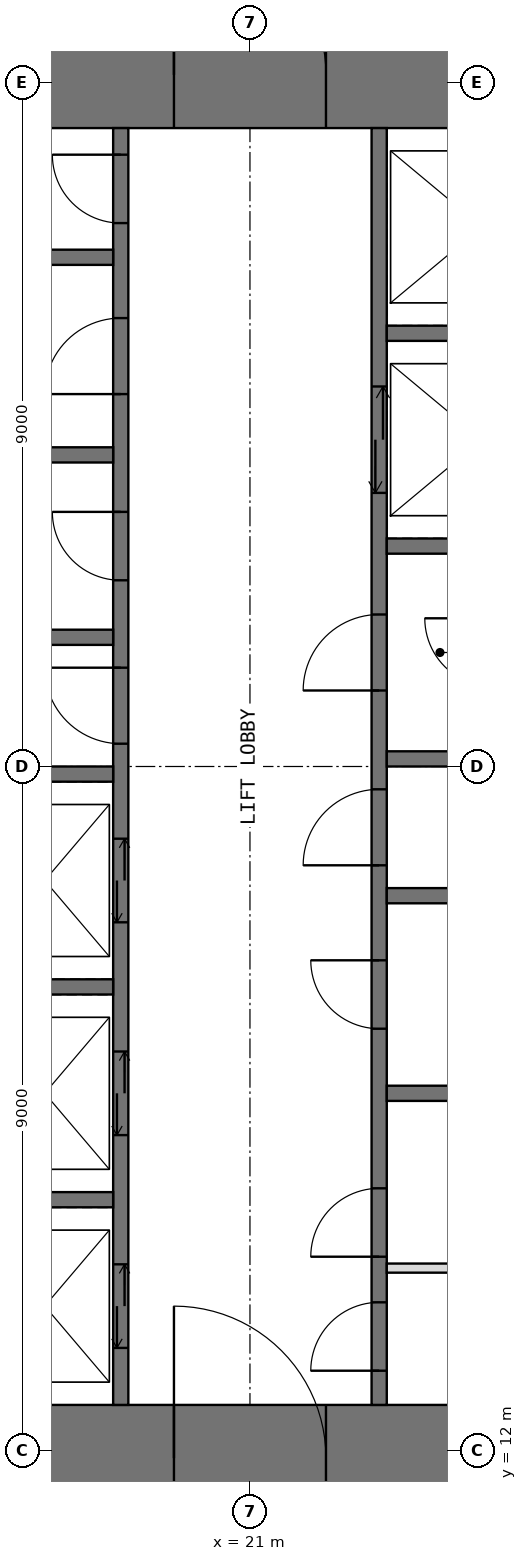
"""IFC4 building model, lengths in metres.
Left out: names, types, materials, properties, quantities, classifications, styles, units other than length and angle.
Written with IfcOpenShell. Run it as: python <this file> out.ifc"""

import sys

from ifc_helpers import new_model, si_unit, direction, frame, frame_2d, origin, place, context, subcontext, project, spatial, rectangle, extrude, element, fill, save


model = new_model("IFC4")
c1 = context("Model", 3, precision=1e-05, world=origin(), true_north=direction((0.0, 1.0)))
c2 = subcontext(c1, "Body", "Model", "MODEL_VIEW")
j1 = project(units=[si_unit("LENGTHUNIT", "METRE"), si_unit("PLANEANGLEUNIT", "RADIAN")], contexts=[c1])
p1 = place(None, origin())
s1 = spatial("IfcSite", under=j1, at=p1, CompositionType="ELEMENT")
p2 = place(p1, origin())
s2 = spatial("IfcBuilding", under=s1, at=p2, CompositionType="ELEMENT")
p3 = place(p2, frame((0.0, 0.0, 165.5)))
s3 = spatial("IfcBuildingStorey", under=s2, at=p3, CompositionType="ELEMENT", Elevation=165.5)
p4 = place(p3, frame((11.2, 11.9, -0.05), z_axis=(0.0, 0.0, 1.0), x_axis=(1.0, 0.0, 0.0)))
e1 = element("IfcWall", 1, at=p4, inside=s3, PredefinedType="SHEAR", context=c2, shape_type="SweptSolid", body=[
    extrude(rectangle(XDim=19.6, YDim=1.4, at=frame_2d((9.8, 0.0))), origin(), (0.0, 0.0, 1.0), 5.0),
])
p5 = place(p4, frame((8.8, 0.0, 0.05)))
e2 = element("IfcOpeningElement", 2, at=p5, cuts=e1, PredefinedType="OPENING", context=c2, shape_type="SweptSolid", body=[
    extrude(rectangle(XDim=2.0, YDim=2.2, at=frame_2d((1.0, 1.1))), frame((0.0, 0.71, 0.0), z_axis=(0.0, -1.0, 0.0), x_axis=(1.0, 0.0, 0.0)), (0.0, 0.0, 1.0), 1.42),
])
p6 = place(p3, frame((11.2, 30.1, -0.05), z_axis=(0.0, 0.0, 1.0), x_axis=(1.0, 0.0, 0.0)))
e3 = element("IfcWall", 3, at=p6, inside=s3, PredefinedType="SHEAR", context=c2, shape_type="SweptSolid", body=[
    extrude(rectangle(XDim=19.6, YDim=1.4, at=frame_2d((9.8, 0.0))), origin(), (0.0, 0.0, 1.0), 5.0),
])
p7 = place(p6, frame((8.8, 0.0, 0.05)))
e4 = element("IfcOpeningElement", 4, at=p7, cuts=e3, PredefinedType="OPENING", context=c2, shape_type="SweptSolid", body=[
    extrude(rectangle(XDim=2.0, YDim=2.2, at=frame_2d((1.0, 1.1))), frame((0.0, 0.71, 0.0), z_axis=(0.0, -1.0, 0.0), x_axis=(1.0, 0.0, 0.0)), (0.0, 0.0, 1.0), 1.42),
])
p8 = place(p3, frame((19.3, 12.6, -0.05), z_axis=(0.0, 0.0, 1.0), x_axis=(0.0, 1.0, 0.0)))
e5 = element("IfcWall", 5, at=p8, inside=s3, PredefinedType="SHEAR", context=c2, shape_type="SweptSolid", body=[
    extrude(rectangle(XDim=16.8, YDim=0.2, at=frame_2d((8.4, 0.0))), origin(), (0.0, 0.0, 1.0), 5.0),
])
p9 = place(p8, frame((8.7, 0.0, 0.05)))
e6 = element("IfcOpeningElement", 6, at=p9, cuts=e5, PredefinedType="OPENING", context=c2, shape_type="SweptSolid", body=[
    extrude(rectangle(XDim=1.0, YDim=2.2, at=frame_2d((0.5, 1.1))), frame((0.0, 0.11, 0.0), z_axis=(0.0, -1.0, 0.0), x_axis=(1.0, 0.0, 0.0)), (0.0, 0.0, 1.0), 0.22),
])
p10 = place(p8, frame((10.85, 0.0, 0.05)))
e7 = element("IfcOpeningElement", 7, at=p10, cuts=e5, PredefinedType="OPENING", context=c2, shape_type="SweptSolid", body=[
    extrude(rectangle(XDim=0.9, YDim=2.2, at=frame_2d((0.45, 1.1))), frame((0.0, 0.11, 0.0), z_axis=(0.0, -1.0, 0.0), x_axis=(1.0, 0.0, 0.0)), (0.0, 0.0, 1.0), 0.22),
])
p11 = place(p8, frame((13.3, 0.0, 0.05)))
e8 = element("IfcOpeningElement", 8, at=p11, cuts=e5, PredefinedType="OPENING", context=c2, shape_type="SweptSolid", body=[
    extrude(rectangle(XDim=1.0, YDim=2.2, at=frame_2d((0.5, 1.1))), frame((0.0, 0.11, 0.0), z_axis=(0.0, -1.0, 0.0), x_axis=(1.0, 0.0, 0.0)), (0.0, 0.0, 1.0), 0.22),
])
p12 = place(p8, frame((15.55, 0.0, 0.05)))
e9 = element("IfcOpeningElement", 9, at=p12, cuts=e5, PredefinedType="OPENING", context=c2, shape_type="SweptSolid", body=[
    extrude(rectangle(XDim=0.9, YDim=2.2, at=frame_2d((0.45, 1.1))), frame((0.0, 0.11, 0.0), z_axis=(0.0, -1.0, 0.0), x_axis=(1.0, 0.0, 0.0)), (0.0, 0.0, 1.0), 0.22),
])
p13 = place(p8, frame((0.75, 0.0, 0.05)))
e10 = element("IfcOpeningElement", 10, at=p13, cuts=e5, PredefinedType="OPENING", context=c2, shape_type="SweptSolid", body=[
    extrude(rectangle(XDim=1.1, YDim=2.2, at=frame_2d((0.55, 1.1))), frame((0.0, 0.11, 0.0), z_axis=(0.0, -1.0, 0.0), x_axis=(1.0, 0.0, 0.0)), (0.0, 0.0, 1.0), 0.22),
])
p14 = place(p8, frame((3.55, 0.0, 0.05)))
e11 = element("IfcOpeningElement", 11, at=p14, cuts=e5, PredefinedType="OPENING", context=c2, shape_type="SweptSolid", body=[
    extrude(rectangle(XDim=1.1, YDim=2.2, at=frame_2d((0.55, 1.1))), frame((0.0, 0.11, 0.0), z_axis=(0.0, -1.0, 0.0), x_axis=(1.0, 0.0, 0.0)), (0.0, 0.0, 1.0), 0.22),
])
p15 = place(p8, frame((6.35, 0.0, 0.05)))
e12 = element("IfcOpeningElement", 12, at=p15, cuts=e5, PredefinedType="OPENING", context=c2, shape_type="SweptSolid", body=[
    extrude(rectangle(XDim=1.1, YDim=2.2, at=frame_2d((0.55, 1.1))), frame((0.0, 0.11, 0.0), z_axis=(0.0, -1.0, 0.0), x_axis=(1.0, 0.0, 0.0)), (0.0, 0.0, 1.0), 0.22),
])
p16 = place(p3, frame((22.7, 12.6, -0.05), z_axis=(0.0, 0.0, 1.0), x_axis=(0.0, 1.0, 0.0)))
e13 = element("IfcWall", 13, at=p16, inside=s3, PredefinedType="SHEAR", context=c2, shape_type="SweptSolid", body=[
    extrude(rectangle(XDim=16.8, YDim=0.2, at=frame_2d((8.4, 0.0))), origin(), (0.0, 0.0, 1.0), 5.0),
])
p17 = place(p16, frame((0.45, 0.0, 0.05)))
e14 = element("IfcOpeningElement", 14, at=p17, cuts=e13, PredefinedType="OPENING", context=c2, shape_type="SweptSolid", body=[
    extrude(rectangle(XDim=0.9, YDim=2.2, at=frame_2d((0.45, 1.1))), frame((0.0, 0.11, 0.0), z_axis=(0.0, -1.0, 0.0), x_axis=(1.0, 0.0, 0.0)), (0.0, 0.0, 1.0), 0.22),
])
p18 = place(p16, frame((7.1, 0.0, 0.05)))
e15 = element("IfcOpeningElement", 15, at=p18, cuts=e13, PredefinedType="OPENING", context=c2, shape_type="SweptSolid", body=[
    extrude(rectangle(XDim=1.0, YDim=2.2, at=frame_2d((0.5, 1.1))), frame((0.0, 0.11, 0.0), z_axis=(0.0, -1.0, 0.0), x_axis=(1.0, 0.0, 0.0)), (0.0, 0.0, 1.0), 0.22),
])
p19 = place(p16, frame((1.95, 0.0, 0.05)))
e16 = element("IfcOpeningElement", 16, at=p19, cuts=e13, PredefinedType="OPENING", context=c2, shape_type="SweptSolid", body=[
    extrude(rectangle(XDim=0.9, YDim=2.2, at=frame_2d((0.45, 1.1))), frame((0.0, 0.11, 0.0), z_axis=(0.0, -1.0, 0.0), x_axis=(1.0, 0.0, 0.0)), (0.0, 0.0, 1.0), 0.22),
])
p20 = place(p16, frame((4.95, 0.0, 0.05)))
e17 = element("IfcOpeningElement", 17, at=p20, cuts=e13, PredefinedType="OPENING", context=c2, shape_type="SweptSolid", body=[
    extrude(rectangle(XDim=0.9, YDim=2.2, at=frame_2d((0.45, 1.1))), frame((0.0, 0.11, 0.0), z_axis=(0.0, -1.0, 0.0), x_axis=(1.0, 0.0, 0.0)), (0.0, 0.0, 1.0), 0.22),
])
p21 = place(p16, frame((9.4, 0.0, 0.05)))
e18 = element("IfcOpeningElement", 18, at=p21, cuts=e13, PredefinedType="OPENING", context=c2, shape_type="SweptSolid", body=[
    extrude(rectangle(XDim=1.0, YDim=2.2, at=frame_2d((0.5, 1.1))), frame((0.0, 0.11, 0.0), z_axis=(0.0, -1.0, 0.0), x_axis=(1.0, 0.0, 0.0)), (0.0, 0.0, 1.0), 0.22),
])
p22 = place(p16, frame((12.0, 0.0, 0.05)))
e19 = element("IfcOpeningElement", 19, at=p22, cuts=e13, PredefinedType="OPENING", context=c2, shape_type="SweptSolid", body=[
    extrude(rectangle(XDim=1.4, YDim=2.4, at=frame_2d((0.7, 1.2))), frame((0.0, 0.11, 0.0), z_axis=(0.0, -1.0, 0.0), x_axis=(1.0, 0.0, 0.0)), (0.0, 0.0, 1.0), 0.22),
])
for number, where, z_axis, x_axis in (
    (20, (16.0, 15.3, -0.05), (0.0, 0.0, 1.0), (1.0, 0.0, 0.0)),
    (21, (16.0, 18.1, -0.05), (0.0, 0.0, 1.0), (1.0, 0.0, 0.0)),
    (22, (16.0, 20.9, -0.05), (0.0, 0.0, 1.0), (1.0, 0.0, 0.0)),
    (23, (16.0, 22.7, -0.05), (0.0, 0.0, 1.0), (1.0, 0.0, 0.0)),
    (24, (16.0, 25.1, -0.05), (0.0, 0.0, 1.0), (1.0, 0.0, 0.0)),
    (25, (16.0, 27.7, -0.05), (0.0, 0.0, 1.0), (1.0, 0.0, 0.0)),
    (26, (22.8, 16.7, -0.05), (0.0, 0.0, 1.0), (1.0, 0.0, 0.0)),
    (27, (22.8, 19.3, -0.05), (0.0, 0.0, 1.0), (1.0, 0.0, 0.0)),
    (28, (22.8, 21.1, -0.05), (0.0, 0.0, 1.0), (1.0, 0.0, 0.0)),
    (29, (22.8, 23.9, -0.05), (0.0, 0.0, 1.0), (1.0, 0.0, 0.0)),
    (30, (22.8, 26.7, -0.05), (0.0, 0.0, 1.0), (1.0, 0.0, 0.0)),
):
    element("IfcWall", number, at=place(p3, frame(where, z_axis=z_axis, x_axis=x_axis)), inside=s3, PredefinedType="SHEAR", context=c2, shape_type="SweptSolid", body=[
        extrude(rectangle(XDim=3.2, YDim=0.2, at=frame_2d((1.6, 0.0))), origin(), (0.0, 0.0, 1.0), 5.0),
    ])
p23 = place(p3, frame((22.8, 14.4, 0.0), z_axis=(0.0, 0.0, 1.0), x_axis=(1.0, 0.0, 0.0)))
e31 = element("IfcWall", 31, at=p23, inside=s3, PredefinedType="PARTITIONING", context=c2, shape_type="SweptSolid", body=[
    extrude(rectangle(XDim=3.2, YDim=0.12, at=frame_2d((1.6, 0.0))), origin(), (0.0, 0.0, 1.0), 4.75),
])
p24 = place(p5, origin())
e32 = element("IfcDoor", 32, at=p24, inside=s3, OperationType="DOUBLE_DOOR_SINGLE_SWING", PredefinedType="DOOR", context=c2, shape_type="SweptSolid", body=[
    extrude(rectangle(XDim=2.0, YDim=2.2, at=frame_2d((1.0, 1.1))), frame((0.0, 0.025, 0.0), z_axis=(0.0, -1.0, 0.0), x_axis=(1.0, 0.0, 0.0)), (0.0, 0.0, 1.0), 0.05),
])
fill(e2, e32)
p25 = place(p7, origin())
e33 = element("IfcDoor", 33, at=p25, inside=s3, OperationType="DOUBLE_DOOR_SINGLE_SWING", PredefinedType="DOOR", context=c2, shape_type="SweptSolid", body=[
    extrude(rectangle(XDim=2.0, YDim=2.2, at=frame_2d((1.0, 1.1))), frame((0.0, 0.025, 0.0), z_axis=(0.0, -1.0, 0.0), x_axis=(1.0, 0.0, 0.0)), (0.0, 0.0, 1.0), 0.05),
])
fill(e4, e33)
p26 = place(p17, origin())
e34 = element("IfcDoor", 34, at=p26, inside=s3, OperationType="SINGLE_SWING_LEFT", PredefinedType="DOOR", context=c2, shape_type="SweptSolid", body=[
    extrude(rectangle(XDim=0.9, YDim=2.2, at=frame_2d((0.45, 1.1))), frame((0.0, 0.025, 0.0), z_axis=(0.0, -1.0, 0.0), x_axis=(1.0, 0.0, 0.0)), (0.0, 0.0, 1.0), 0.05),
])
fill(e14, e34)
p27 = place(p9, origin())
e35 = element("IfcDoor", 35, at=p27, inside=s3, OperationType="SINGLE_SWING_RIGHT", PredefinedType="DOOR", context=c2, shape_type="SweptSolid", body=[
    extrude(rectangle(XDim=1.0, YDim=2.2, at=frame_2d((0.5, 1.1))), frame((0.0, 0.025, 0.0), z_axis=(0.0, -1.0, 0.0), x_axis=(1.0, 0.0, 0.0)), (0.0, 0.0, 1.0), 0.05),
])
fill(e6, e35)
p28 = place(p18, origin())
e36 = element("IfcDoor", 36, at=p28, inside=s3, OperationType="SINGLE_SWING_LEFT", PredefinedType="DOOR", context=c2, shape_type="SweptSolid", body=[
    extrude(rectangle(XDim=1.0, YDim=2.2, at=frame_2d((0.5, 1.1))), frame((0.0, 0.025, 0.0), z_axis=(0.0, -1.0, 0.0), x_axis=(1.0, 0.0, 0.0)), (0.0, 0.0, 1.0), 0.05),
])
fill(e15, e36)
p29 = place(p10, origin())
e37 = element("IfcDoor", 37, at=p29, inside=s3, OperationType="SINGLE_SWING_RIGHT", PredefinedType="DOOR", context=c2, shape_type="SweptSolid", body=[
    extrude(rectangle(XDim=0.9, YDim=2.2, at=frame_2d((0.45, 1.1))), frame((0.0, 0.025, 0.0), z_axis=(0.0, -1.0, 0.0), x_axis=(1.0, 0.0, 0.0)), (0.0, 0.0, 1.0), 0.05),
])
fill(e7, e37)
p30 = place(p11, origin())
e38 = element("IfcDoor", 38, at=p30, inside=s3, OperationType="SINGLE_SWING_LEFT", PredefinedType="DOOR", context=c2, shape_type="SweptSolid", body=[
    extrude(rectangle(XDim=1.0, YDim=2.2, at=frame_2d((0.5, 1.1))), frame((0.0, 0.025, 0.0), z_axis=(0.0, -1.0, 0.0), x_axis=(1.0, 0.0, 0.0)), (0.0, 0.0, 1.0), 0.05),
])
fill(e8, e38)
p31 = place(p12, origin())
e39 = element("IfcDoor", 39, at=p31, inside=s3, OperationType="SINGLE_SWING_RIGHT", PredefinedType="DOOR", context=c2, shape_type="SweptSolid", body=[
    extrude(rectangle(XDim=0.9, YDim=2.2, at=frame_2d((0.45, 1.1))), frame((0.0, 0.025, 0.0), z_axis=(0.0, -1.0, 0.0), x_axis=(1.0, 0.0, 0.0)), (0.0, 0.0, 1.0), 0.05),
])
fill(e9, e39)
p32 = place(p19, origin())
e40 = element("IfcDoor", 40, at=p32, inside=s3, OperationType="SINGLE_SWING_LEFT", PredefinedType="DOOR", context=c2, shape_type="SweptSolid", body=[
    extrude(rectangle(XDim=0.9, YDim=2.2, at=frame_2d((0.45, 1.1))), frame((0.0, 0.025, 0.0), z_axis=(0.0, -1.0, 0.0), x_axis=(1.0, 0.0, 0.0)), (0.0, 0.0, 1.0), 0.05),
])
fill(e16, e40)
p33 = place(p20, origin())
e41 = element("IfcDoor", 41, at=p33, inside=s3, OperationType="SINGLE_SWING_RIGHT", PredefinedType="DOOR", context=c2, shape_type="SweptSolid", body=[
    extrude(rectangle(XDim=0.9, YDim=2.2, at=frame_2d((0.45, 1.1))), frame((0.0, 0.025, 0.0), z_axis=(0.0, -1.0, 0.0), x_axis=(1.0, 0.0, 0.0)), (0.0, 0.0, 1.0), 0.05),
])
fill(e17, e41)
p34 = place(p21, origin())
e42 = element("IfcDoor", 42, at=p34, inside=s3, OperationType="SINGLE_SWING_LEFT", PredefinedType="DOOR", context=c2, shape_type="SweptSolid", body=[
    extrude(rectangle(XDim=1.0, YDim=2.2, at=frame_2d((0.5, 1.1))), frame((0.0, 0.025, 0.0), z_axis=(0.0, -1.0, 0.0), x_axis=(1.0, 0.0, 0.0)), (0.0, 0.0, 1.0), 0.05),
])
fill(e18, e42)
p35 = place(p13, origin())
e43 = element("IfcDoor", 43, at=p35, inside=s3, OperationType="DOUBLE_DOOR_SLIDING", PredefinedType="DOOR", context=c2, shape_type="SweptSolid", body=[
    extrude(rectangle(XDim=1.1, YDim=2.2, at=frame_2d((0.55, 1.1))), frame((0.0, 0.025, 0.0), z_axis=(0.0, -1.0, 0.0), x_axis=(1.0, 0.0, 0.0)), (0.0, 0.0, 1.0), 0.05),
])
fill(e10, e43)
p36 = place(p14, origin())
e44 = element("IfcDoor", 44, at=p36, inside=s3, OperationType="DOUBLE_DOOR_SLIDING", PredefinedType="DOOR", context=c2, shape_type="SweptSolid", body=[
    extrude(rectangle(XDim=1.1, YDim=2.2, at=frame_2d((0.55, 1.1))), frame((0.0, 0.025, 0.0), z_axis=(0.0, -1.0, 0.0), x_axis=(1.0, 0.0, 0.0)), (0.0, 0.0, 1.0), 0.05),
])
fill(e11, e44)
p37 = place(p15, origin())
e45 = element("IfcDoor", 45, at=p37, inside=s3, OperationType="DOUBLE_DOOR_SLIDING", PredefinedType="DOOR", context=c2, shape_type="SweptSolid", body=[
    extrude(rectangle(XDim=1.1, YDim=2.2, at=frame_2d((0.55, 1.1))), frame((0.0, 0.025, 0.0), z_axis=(0.0, -1.0, 0.0), x_axis=(1.0, 0.0, 0.0)), (0.0, 0.0, 1.0), 0.05),
])
fill(e12, e45)
p38 = place(p22, origin())
e46 = element("IfcDoor", 46, at=p38, inside=s3, OperationType="DOUBLE_DOOR_SLIDING", PredefinedType="DOOR", context=c2, shape_type="SweptSolid", body=[
    extrude(rectangle(XDim=1.4, YDim=2.4, at=frame_2d((0.7, 1.2))), frame((0.0, 0.025, 0.0), z_axis=(0.0, -1.0, 0.0), x_axis=(1.0, 0.0, 0.0)), (0.0, 0.0, 1.0), 0.05),
])
fill(e19, e46)
save(model, sys.argv[1])
